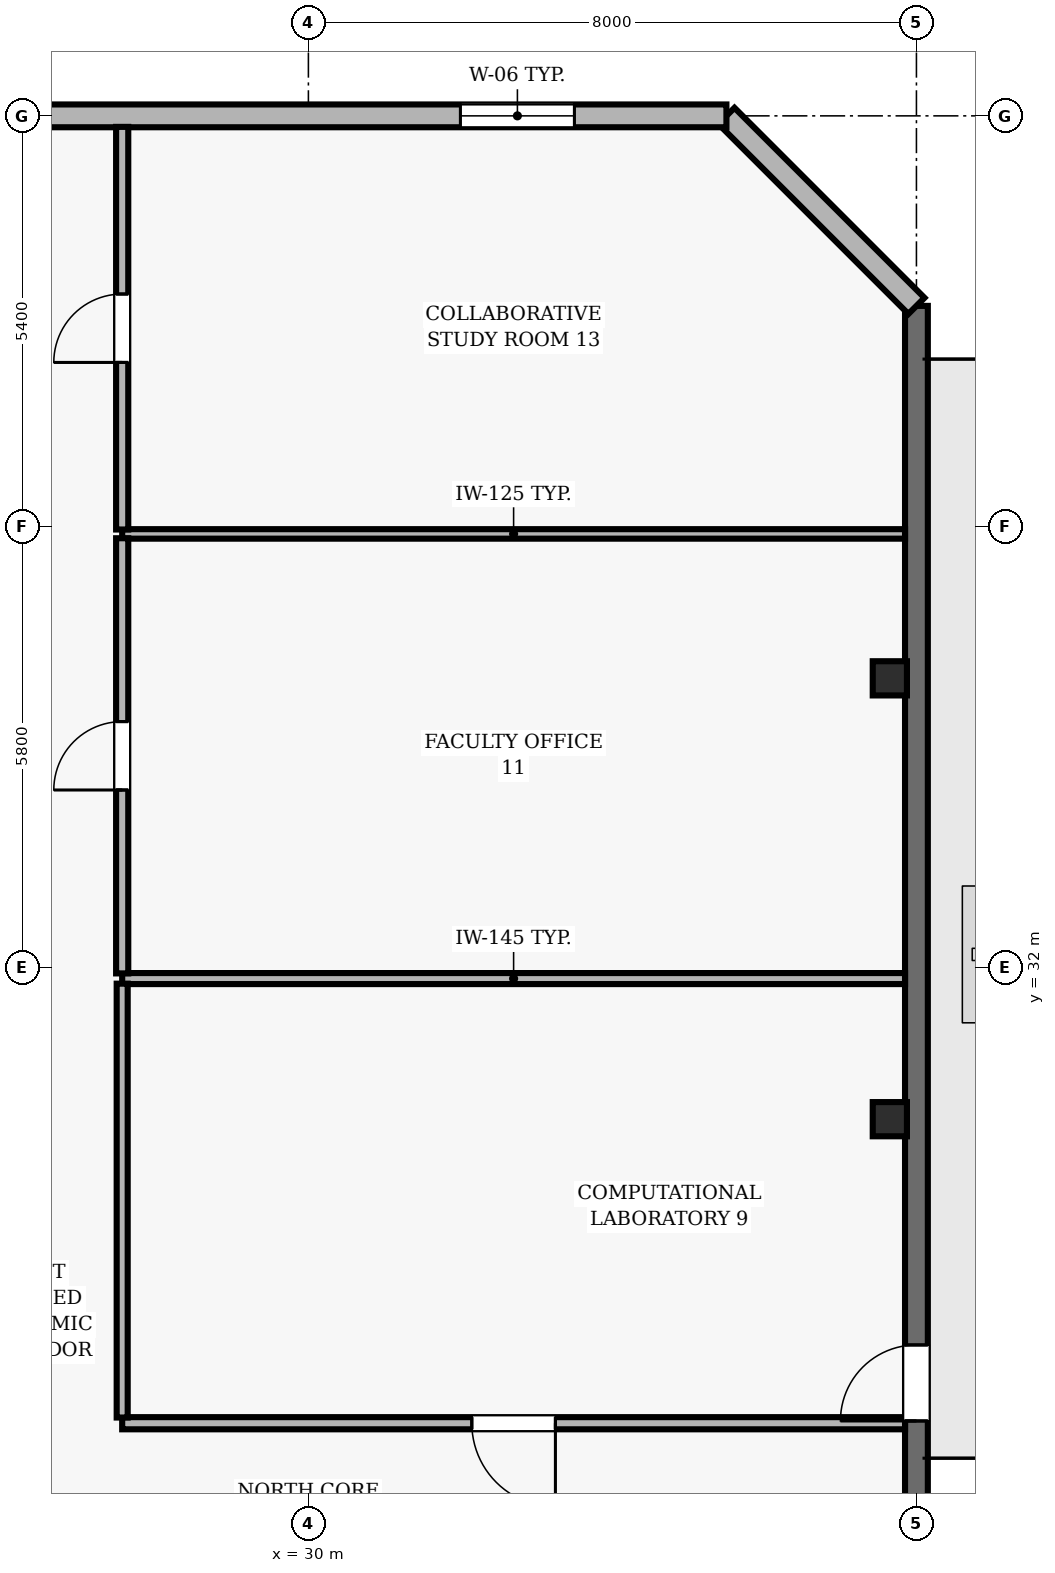
"""IFC4 building model, lengths in metres.
Left out: names, types, materials, properties, quantities, classifications, styles, units other than length and angle.
Written with IfcOpenShell. Run it as: python <this file> out.ifc"""

import sys

from ifc_helpers import new_model, si_unit, direction, frame, frame_2d, origin, origin_2d, place, context, subcontext, project, spatial, rectangle, hollow_rectangle, extrude, element, fill, save


model = new_model("IFC4")
c1 = context("Model", 3, precision=1e-05, world=origin(), true_north=direction((0.0, 1.0)))
c2 = subcontext(c1, "Body", "Model", "MODEL_VIEW")
j1 = project(units=[si_unit("LENGTHUNIT", "METRE"), si_unit("PLANEANGLEUNIT", "RADIAN")], contexts=[c1])
p1 = place(None, origin())
s1 = spatial("IfcSite", under=j1, at=p1, CompositionType="ELEMENT")
p2 = place(p1, origin())
s2 = spatial("IfcBuilding", under=s1, at=p2, CompositionType="ELEMENT")
p3 = place(p2, frame((0.0, 0.0, 179.7)))
s3 = spatial("IfcBuildingStorey", under=s2, at=p3, CompositionType="ELEMENT", Elevation=179.7)
for number, where, z_axis, x_axis in (
    (1, (37.65, 30.0, 0.0), (0.0, 0.0, 1.0), (1.0, 0.0, 0.0)),
    (2, (37.65, 35.8, 0.0), (0.0, 0.0, 1.0), (1.0, 0.0, 0.0)),
):
    element("IfcColumn", number, at=place(p3, frame(where, z_axis=z_axis, x_axis=x_axis)), inside=s3, PredefinedType="COLUMN", context=c2, shape_type="SweptSolid", body=[
        extrude(hollow_rectangle(XDim=0.45, YDim=0.45, WallThickness=0.02, at=origin_2d()), origin(), (0.0, 0.0, 1.0), 3.9),
    ])
p4 = place(p3, frame((38.0, 24.0, 0.0), z_axis=(0.0, 0.0, 1.0), x_axis=(0.0, 1.0, 0.0)))
e3 = element("IfcWall", 3, at=p4, inside=s3, PredefinedType="SOLIDWALL", context=c2, shape_type="SweptSolid", body=[
    extrude(rectangle(XDim=16.7, YDim=0.3, at=frame_2d((8.35, 0.0))), origin(), (0.0, 0.0, 1.0), 3.69),
])
p5 = place(p4, frame((2.03, 0.0, 0.0)))
e4 = element("IfcOpeningElement", 4, at=p5, cuts=e3, PredefinedType="OPENING", context=c2, shape_type="SweptSolid", body=[
    extrude(rectangle(XDim=1.0, YDim=2.2, at=frame_2d((0.5, 1.1))), frame((0.0, 0.16, 0.0), z_axis=(0.0, -1.0, 0.0), x_axis=(1.0, 0.0, 0.0)), (0.0, 0.0, 1.0), 0.32),
])
p6 = place(p3, frame((38.0, 40.7, 0.0), z_axis=(0.0, 0.0, 1.0), x_axis=(-0.707106781187, 0.707106781187, 0.0)))
e5 = element("IfcWall", 5, at=p6, inside=s3, PredefinedType="SOLIDWALL", context=c2, shape_type="SweptSolid", body=[
    extrude(rectangle(XDim=3.536, YDim=0.3, at=frame_2d((1.768, 0.0))), origin(), (0.0, 0.0, 1.0), 3.69),
])
p7 = place(p3, frame((35.5, 43.2, 0.0), z_axis=(0.0, 0.0, 1.0), x_axis=(-1.0, 0.0, 0.0)))
e6 = element("IfcWall", 6, at=p7, inside=s3, PredefinedType="SOLIDWALL", context=c2, shape_type="SweptSolid", body=[
    extrude(rectangle(XDim=11.0, YDim=0.3, at=frame_2d((5.5, 0.0))), origin(), (0.0, 0.0, 1.0), 3.69),
])
p8 = place(p7, frame((2.0, 0.0, 0.9)))
e7 = element("IfcOpeningElement", 7, at=p8, cuts=e6, PredefinedType="OPENING", context=c2, shape_type="SweptSolid", body=[
    extrude(rectangle(XDim=1.5, YDim=1.8, at=frame_2d((0.75, 0.9))), frame((0.0, 0.16, 0.0), z_axis=(0.0, -1.0, 0.0), x_axis=(1.0, 0.0, 0.0)), (0.0, 0.0, 1.0), 0.32),
])
p9 = place(p3, frame((37.85, 26.0, 0.0), z_axis=(0.0, 0.0, 1.0), x_axis=(-1.0, 0.0, 0.0)))
e8 = element("IfcWall", 8, at=p9, inside=s3, PredefinedType="PARTITIONING", context=c2, shape_type="SweptSolid", body=[
    extrude(rectangle(XDim=10.3, YDim=0.16, at=frame_2d((5.15, 0.0))), origin(), (0.0, 0.0, 1.0), 3.69),
])
p10 = place(p9, frame((4.6, 0.0, 0.0)))
e9 = element("IfcOpeningElement", 9, at=p10, cuts=e8, PredefinedType="OPENING", context=c2, shape_type="SweptSolid", body=[
    extrude(rectangle(XDim=1.1, YDim=2.15, at=frame_2d((0.55, 1.075))), frame((0.0, 0.09, 0.0), z_axis=(0.0, -1.0, 0.0), x_axis=(1.0, 0.0, 0.0)), (0.0, 0.0, 1.0), 0.18),
])
p11 = place(p3, frame((37.85, 31.85, 0.0), z_axis=(0.0, 0.0, 1.0), x_axis=(-1.0, 0.0, 0.0)))
e10 = element("IfcWall", 10, at=p11, inside=s3, PredefinedType="PARTITIONING", context=c2, shape_type="SweptSolid", body=[
    extrude(rectangle(XDim=10.3, YDim=0.145, at=frame_2d((5.15, 0.0))), origin(), (0.0, 0.0, 1.0), 3.69),
])
p12 = place(p3, frame((37.85, 37.7, 0.0), z_axis=(0.0, 0.0, 1.0), x_axis=(-1.0, 0.0, 0.0)))
e11 = element("IfcWall", 11, at=p12, inside=s3, PredefinedType="PARTITIONING", context=c2, shape_type="SweptSolid", body=[
    extrude(rectangle(XDim=10.3, YDim=0.125, at=frame_2d((5.15, 0.0))), origin(), (0.0, 0.0, 1.0), 3.69),
])
p13 = place(p3, frame((27.55, 26.075, 0.0), z_axis=(0.0, 0.0, 1.0), x_axis=(0.0, 1.0, 0.0)))
e12 = element("IfcWall", 12, at=p13, inside=s3, PredefinedType="PARTITIONING", context=c2, shape_type="SweptSolid", body=[
    extrude(rectangle(XDim=5.708, YDim=0.145, at=frame_2d((2.854, 0.0))), origin(), (0.0, 0.0, 1.0), 3.69),
])
p14 = place(p3, frame((27.55, 31.918, 0.0), z_axis=(0.0, 0.0, 1.0), x_axis=(0.0, 1.0, 0.0)))
e13 = element("IfcWall", 13, at=p14, inside=s3, PredefinedType="PARTITIONING", context=c2, shape_type="SweptSolid", body=[
    extrude(rectangle(XDim=5.725, YDim=0.16, at=frame_2d((2.863, 0.0))), origin(), (0.0, 0.0, 1.0), 3.69),
])
p15 = place(p14, frame((2.413, 0.0, 0.0)))
e14 = element("IfcOpeningElement", 14, at=p15, cuts=e13, PredefinedType="OPENING", context=c2, shape_type="SweptSolid", body=[
    extrude(rectangle(XDim=0.9, YDim=2.1, at=frame_2d((0.45, 1.05))), frame((0.0, 0.09, 0.0), z_axis=(0.0, -1.0, 0.0), x_axis=(1.0, 0.0, 0.0)), (0.0, 0.0, 1.0), 0.18),
])
p16 = place(p3, frame((27.55, 37.758, 0.0), z_axis=(0.0, 0.0, 1.0), x_axis=(0.0, 1.0, 0.0)))
e15 = element("IfcWall", 15, at=p16, inside=s3, PredefinedType="PARTITIONING", context=c2, shape_type="SweptSolid", body=[
    extrude(rectangle(XDim=5.297, YDim=0.16, at=frame_2d((2.648, 0.0))), origin(), (0.0, 0.0, 1.0), 3.69),
])
p17 = place(p16, frame((2.198, 0.0, 0.0)))
e16 = element("IfcOpeningElement", 16, at=p17, cuts=e15, PredefinedType="OPENING", context=c2, shape_type="SweptSolid", body=[
    extrude(rectangle(XDim=0.9, YDim=2.1, at=frame_2d((0.45, 1.05))), frame((0.0, 0.09, 0.0), z_axis=(0.0, -1.0, 0.0), x_axis=(1.0, 0.0, 0.0)), (0.0, 0.0, 1.0), 0.18),
])
p18 = place(p5, origin())
e17 = element("IfcDoor", 17, at=p18, inside=s3, OperationType="SINGLE_SWING_LEFT", PredefinedType="DOOR", context=c2, shape_type="SweptSolid", body=[
    extrude(rectangle(XDim=1.0, YDim=2.2, at=frame_2d((0.5, 1.1))), frame((0.0, 0.025, 0.0), z_axis=(0.0, -1.0, 0.0), x_axis=(1.0, 0.0, 0.0)), (0.0, 0.0, 1.0), 0.05),
])
fill(e4, e17)
p19 = place(p8, origin())
e18 = element("IfcWindow", 18, at=p19, inside=s3, PartitioningType="SINGLE_PANEL", PredefinedType="WINDOW", context=c2, shape_type="SweptSolid", body=[
    extrude(rectangle(XDim=1.5, YDim=1.8, at=frame_2d((0.75, 0.9))), frame((0.0, 0.03, 0.0), z_axis=(0.0, -1.0, 0.0), x_axis=(1.0, 0.0, 0.0)), (0.0, 0.0, 1.0), 0.06),
])
fill(e7, e18)
p20 = place(p10, origin())
e19 = element("IfcDoor", 19, at=p20, inside=s3, OperationType="SINGLE_SWING_LEFT", PredefinedType="DOOR", context=c2, shape_type="SweptSolid", body=[
    extrude(rectangle(XDim=1.1, YDim=2.15, at=frame_2d((0.55, 1.075))), frame((0.0, 0.025, 0.0), z_axis=(0.0, -1.0, 0.0), x_axis=(1.0, 0.0, 0.0)), (0.0, 0.0, 1.0), 0.05),
])
fill(e9, e19)
p21 = place(p15, origin())
e20 = element("IfcDoor", 20, at=p21, inside=s3, OperationType="SINGLE_SWING_LEFT", PredefinedType="DOOR", context=c2, shape_type="SweptSolid", body=[
    extrude(rectangle(XDim=0.9, YDim=2.1, at=frame_2d((0.45, 1.05))), frame((0.0, 0.025, 0.0), z_axis=(0.0, -1.0, 0.0), x_axis=(1.0, 0.0, 0.0)), (0.0, 0.0, 1.0), 0.05),
])
fill(e14, e20)
p22 = place(p17, origin())
e21 = element("IfcDoor", 21, at=p22, inside=s3, OperationType="SINGLE_SWING_LEFT", PredefinedType="DOOR", context=c2, shape_type="SweptSolid", body=[
    extrude(rectangle(XDim=0.9, YDim=2.1, at=frame_2d((0.45, 1.05))), frame((0.0, 0.025, 0.0), z_axis=(0.0, -1.0, 0.0), x_axis=(1.0, 0.0, 0.0)), (0.0, 0.0, 1.0), 0.05),
])
fill(e16, e21)
save(model, sys.argv[1])
